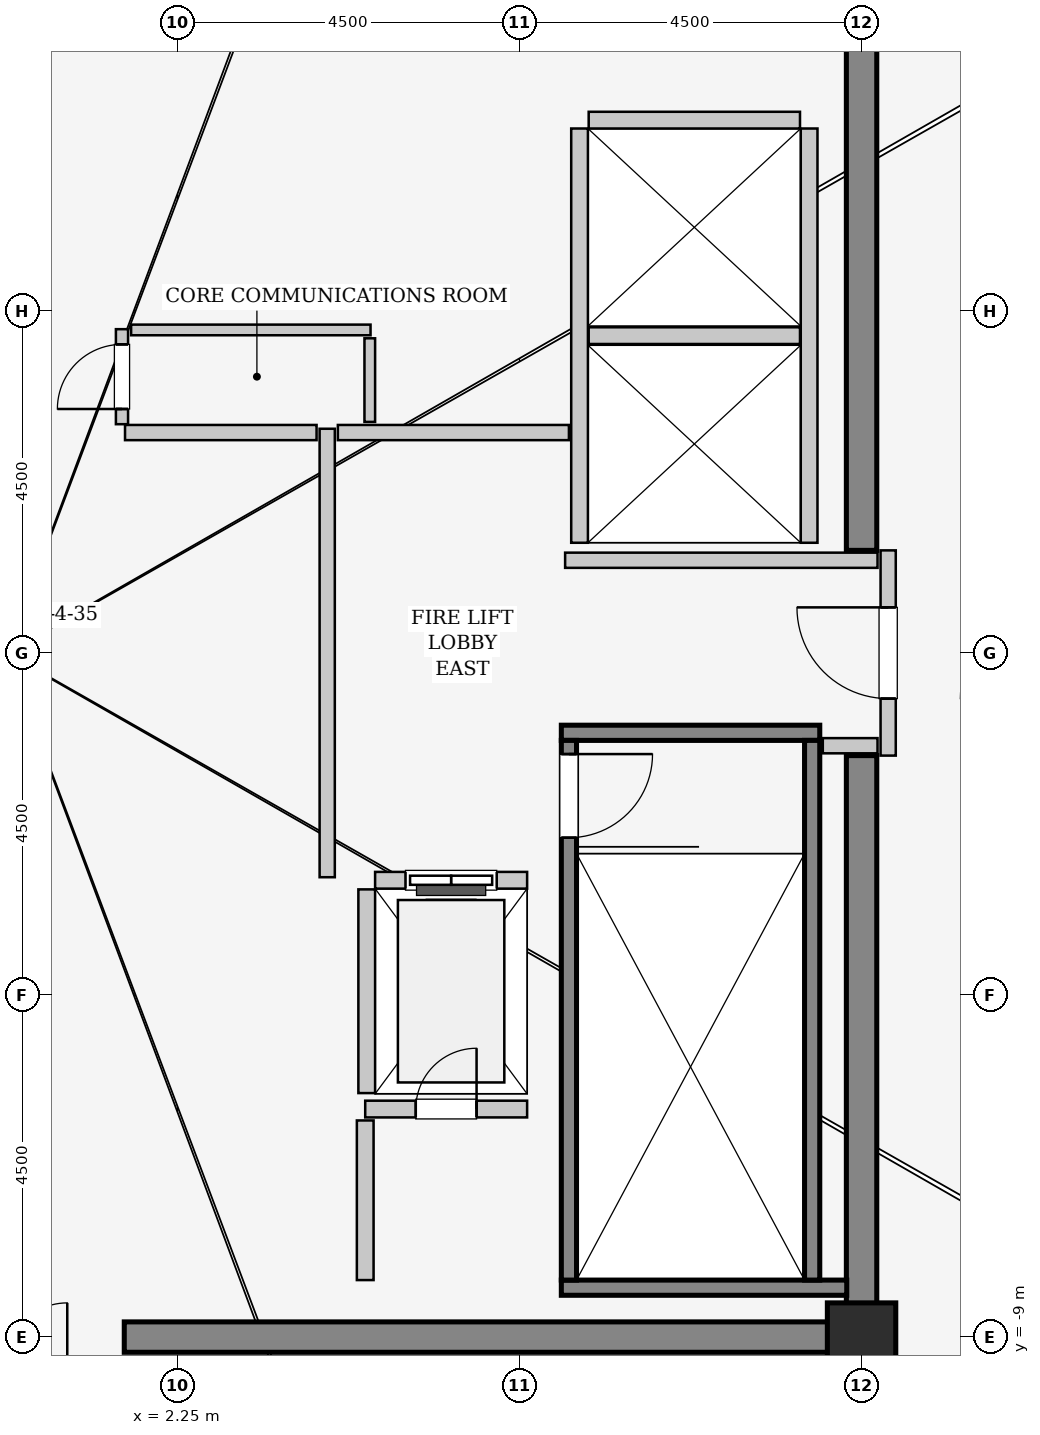
"""IFC4 building model, lengths in metres.
Left out: names, types, materials, properties, quantities, classifications, styles, units other than length and angle.
Written with IfcOpenShell. Run it as: python <this file> out.ifc"""

import sys

from ifc_helpers import new_model, si_unit, direction, frame, frame_2d, origin, origin_2d, place, context, subcontext, project, spatial, rectangle, extrude, source, transform, mapped, element, fill, save


model = new_model("IFC4")
c1 = context("Model", 3, precision=1e-05, world=origin(), true_north=direction((0.0, 1.0)))
c2 = subcontext(c1, "Body", "Model", "MODEL_VIEW")
j1 = project(units=[si_unit("LENGTHUNIT", "METRE"), si_unit("PLANEANGLEUNIT", "RADIAN")], contexts=[c1])
p1 = place(None, origin())
s1 = spatial("IfcSite", under=j1, at=p1, CompositionType="ELEMENT")
p2 = place(p1, origin())
s2 = spatial("IfcBuilding", under=s1, at=p2, CompositionType="ELEMENT")
p3 = place(p2, frame((0.0, 0.0, 367.4)))
s3 = spatial("IfcBuildingStorey", under=s2, at=p3, CompositionType="ELEMENT", Elevation=367.4)
m1 = source(origin(), c2, "Body", "SweptSolid", [
    extrude(rectangle(XDim=9.9, YDim=0.4, at=frame_2d((4.95, 0.0))), origin(), (0.0, 0.0, 1.0), 4.4),
])
p4 = place(p3, frame((1.55, -9.0, 0.0), z_axis=(0.0, 0.0, 1.0), x_axis=(1.0, 0.0, 0.0)))
e1 = element("IfcWall", 1, at=p4, inside=s3, PredefinedType="SHEAR", context=c2, shape_type="MappedRepresentation", body=[
    mapped(m1, transform((0.0, 0.0, 0.0), x_axis=(1.0, 0.0, 0.0), y_axis=(0.0, 1.0, 0.0), z_axis=(0.0, 0.0, 1.0), scale=1.0)),
])
m2 = source(origin(), c2, "Body", "SweptSolid", [
    extrude(rectangle(XDim=7.45, YDim=0.4, at=frame_2d((3.725, 0.0))), origin(), (0.0, 0.0, 1.0), 4.4),
])
for number, where, z_axis, x_axis in (
    (2, (11.25, -8.8, 0.0), (0.0, 0.0, 1.0), (0.0, 1.0, 0.0)),
    (3, (11.25, 1.35, 0.0), (0.0, 0.0, 1.0), (0.0, 1.0, 0.0)),
):
    element("IfcWall", number, at=place(p3, frame(where, z_axis=z_axis, x_axis=x_axis)), inside=s3, PredefinedType="SHEAR", context=c2, shape_type="MappedRepresentation", body=[
        mapped(m2, transform((0.0, 0.0, 0.0), x_axis=(1.0, 0.0, 0.0), y_axis=(0.0, 1.0, 0.0), z_axis=(0.0, 0.0, 1.0), scale=1.0)),
    ])
m3 = source(origin(), c2, "Body", "SweptSolid", [
    extrude(rectangle(XDim=0.9, YDim=0.9, at=origin_2d()), origin(), (0.0, 0.0, 1.0), 4.4),
])
p5 = place(p3, frame((11.25, -9.0, 0.0), z_axis=(0.0, 0.0, 1.0), x_axis=(1.0, 0.0, 0.0)))
e4 = element("IfcColumn", 4, at=p5, inside=s3, PredefinedType="COLUMN", context=c2, shape_type="MappedRepresentation", body=[
    mapped(m3, transform((0.0, 0.0, 0.0), x_axis=(1.0, 0.0, 0.0), y_axis=(0.0, 1.0, 0.0), z_axis=(0.0, 0.0, 1.0), scale=1.0)),
])
m4 = source(origin(), c2, "Body", "SweptSolid", [
    extrude(rectangle(XDim=3.4, YDim=0.2, at=frame_2d((1.7, 0.0))), origin(), (0.0, 0.0, 1.0), 4.1),
])
p6 = place(p3, frame((7.3, -1.05, 0.0), z_axis=(0.0, 0.0, 1.0), x_axis=(1.0, 0.0, 0.0)))
e5 = element("IfcWall", 5, at=p6, inside=s3, PredefinedType="SOLIDWALL", context=c2, shape_type="MappedRepresentation", body=[
    mapped(m4, transform((0.0, 0.0, 0.0), x_axis=(1.0, 0.0, 0.0), y_axis=(0.0, 1.0, 0.0), z_axis=(0.0, 0.0, 1.0), scale=1.0)),
])
m5 = source(origin(), c2, "Body", "SweptSolid", [
    extrude(rectangle(XDim=3.755, YDim=0.2, at=frame_2d((1.877, 0.0))), origin(), (0.0, 0.0, 1.0), 4.1),
])
p7 = place(p3, frame((7.3, -8.35, 0.0), z_axis=(0.0, 0.0, 1.0), x_axis=(1.0, 0.0, 0.0)))
e6 = element("IfcWall", 6, at=p7, inside=s3, PredefinedType="SOLIDWALL", context=c2, shape_type="MappedRepresentation", body=[
    mapped(m5, transform((0.0, 0.0, 0.0), x_axis=(1.0, 0.0, 0.0), y_axis=(0.0, 1.0, 0.0), z_axis=(0.0, 0.0, 1.0), scale=1.0)),
])
m6 = source(origin(), c2, "Body", "SweptSolid", [
    extrude(rectangle(XDim=7.1, YDim=0.2, at=frame_2d((3.55, 0.0))), origin(), (0.0, 0.0, 1.0), 4.1),
])
p8 = place(p3, frame((7.4, -1.15, 0.0), z_axis=(0.0, 0.0, 1.0), x_axis=(0.0, -1.0, 0.0)))
e7 = element("IfcWall", 7, at=p8, inside=s3, PredefinedType="SOLIDWALL", context=c2, shape_type="MappedRepresentation", body=[
    mapped(m6, transform((0.0, 0.0, 0.0), x_axis=(1.0, 0.0, 0.0), y_axis=(0.0, 1.0, 0.0), z_axis=(0.0, 0.0, 1.0), scale=1.0)),
])
p9 = place(p8, frame((0.18, 0.0, 0.0)))
e8 = element("IfcOpeningElement", 8, at=p9, cuts=e7, PredefinedType="OPENING", context=c2, shape_type="SweptSolid", body=[
    extrude(rectangle(XDim=1.1, YDim=2.15, at=frame_2d((0.55, 1.075))), frame((0.0, 0.11, 0.0), z_axis=(0.0, -1.0, 0.0), x_axis=(1.0, 0.0, 0.0)), (0.0, 0.0, 1.0), 0.22),
])
p10 = place(p3, frame((10.6, -1.15, 0.0), z_axis=(0.0, 0.0, 1.0), x_axis=(0.0, -1.0, 0.0)))
e9 = element("IfcWall", 9, at=p10, inside=s3, PredefinedType="SOLIDWALL", context=c2, shape_type="MappedRepresentation", body=[
    mapped(m6, transform((0.0, 0.0, 0.0), x_axis=(1.0, 0.0, 0.0), y_axis=(0.0, 1.0, 0.0), z_axis=(0.0, 0.0, 1.0), scale=1.0)),
])
m7 = source(origin(), c2, "Body", "SweptSolid", [
    extrude(rectangle(XDim=2.0, YDim=0.22, at=frame_2d((1.0, 0.0))), origin(), (0.0, 0.0, 1.0), 4.085),
])
p11 = place(p3, frame((6.85, -2.99, 0.0), z_axis=(0.0, 0.0, 1.0), x_axis=(-1.0, 0.0, 0.0)))
e10 = element("IfcWall", 10, at=p11, inside=s3, PredefinedType="SOLIDWALL", context=c2, shape_type="MappedRepresentation", body=[
    mapped(m7, transform((0.0, 0.0, 0.0), x_axis=(1.0, 0.0, 0.0), y_axis=(0.0, 1.0, 0.0), z_axis=(0.0, 0.0, 1.0), scale=1.0)),
])
p12 = place(p11, frame((0.4, 0.0, 0.0)))
e11 = element("IfcOpeningElement", 11, at=p12, cuts=e10, PredefinedType="OPENING", context=c2, shape_type="SweptSolid", body=[
    extrude(rectangle(XDim=1.2, YDim=2.2, at=frame_2d((0.6, 1.1))), frame((0.0, 0.12, 0.0), z_axis=(0.0, -1.0, 0.0), x_axis=(1.0, 0.0, 0.0)), (0.0, 0.0, 1.0), 0.24),
])
m8 = source(origin(), c2, "Body", "SweptSolid", [
    extrude(rectangle(XDim=2.68, YDim=0.22, at=frame_2d((1.34, 0.0))), origin(), (0.0, 0.0, 1.0), 4.085),
])
p13 = place(p3, frame((4.74, -3.11, 0.0), z_axis=(0.0, 0.0, 1.0), x_axis=(0.0, -1.0, 0.0)))
e12 = element("IfcWall", 12, at=p13, inside=s3, PredefinedType="SOLIDWALL", context=c2, shape_type="MappedRepresentation", body=[
    mapped(m8, transform((0.0, 0.0, 0.0), x_axis=(1.0, 0.0, 0.0), y_axis=(0.0, 1.0, 0.0), z_axis=(0.0, 0.0, 1.0), scale=1.0)),
])
m9 = source(origin(), c2, "Body", "SweptSolid", [
    extrude(rectangle(XDim=5.45, YDim=0.22, at=frame_2d((2.725, 0.0))), origin(), (0.0, 0.0, 1.0), 4.085),
])
for number, where, z_axis, x_axis in (
    (13, (7.54, 6.9, 0.0), (0.0, 0.0, 1.0), (0.0, -1.0, 0.0)),
    (14, (10.56, 1.45, 0.0), (0.0, 0.0, 1.0), (0.0, 1.0, 0.0)),
):
    element("IfcWall", number, at=place(p3, frame(where, z_axis=z_axis, x_axis=x_axis)), inside=s3, PredefinedType="SOLIDWALL", context=c2, shape_type="MappedRepresentation", body=[
        mapped(m9, transform((0.0, 0.0, 0.0), x_axis=(1.0, 0.0, 0.0), y_axis=(0.0, 1.0, 0.0), z_axis=(0.0, 0.0, 1.0), scale=1.0)),
    ])
m10 = source(origin(), c2, "Body", "SweptSolid", [
    extrude(rectangle(XDim=2.78, YDim=0.22, at=frame_2d((1.39, 0.0))), origin(), (0.0, 0.0, 1.0), 4.085),
])
for number, where, z_axis, x_axis in (
    (15, (7.66, 4.175, 0.0), (0.0, 0.0, 1.0), (1.0, 0.0, 0.0)),
    (16, (10.44, 7.01, 0.0), (0.0, 0.0, 1.0), (-1.0, 0.0, 0.0)),
):
    element("IfcWall", number, at=place(p3, frame(where, z_axis=z_axis, x_axis=x_axis)), inside=s3, PredefinedType="SOLIDWALL", context=c2, shape_type="MappedRepresentation", body=[
        mapped(m10, transform((0.0, 0.0, 0.0), x_axis=(1.0, 0.0, 0.0), y_axis=(0.0, 1.0, 0.0), z_axis=(0.0, 0.0, 1.0), scale=1.0)),
    ])
m11 = source(origin(), c2, "Body", "SweptSolid", [
    extrude(rectangle(XDim=2.13, YDim=0.22, at=frame_2d((1.065, 0.0))), origin(), (0.0, 0.0, 1.0), 4.085),
])
p14 = place(p3, frame((4.72, -6.0, 0.0), z_axis=(0.0, 0.0, 1.0), x_axis=(1.0, 0.0, 0.0)))
e17 = element("IfcWall", 17, at=p14, inside=s3, PredefinedType="SOLIDWALL", context=c2, shape_type="MappedRepresentation", body=[
    mapped(m11, transform((0.0, 0.0, 0.0), x_axis=(1.0, 0.0, 0.0), y_axis=(0.0, 1.0, 0.0), z_axis=(0.0, 0.0, 1.0), scale=1.0)),
])
p15 = place(p14, frame((0.665, 0.0, 0.0)))
e18 = element("IfcOpeningElement", 18, at=p15, cuts=e17, PredefinedType="OPENING", context=c2, shape_type="SweptSolid", body=[
    extrude(rectangle(XDim=0.8, YDim=2.0, at=frame_2d((0.4, 1.0))), frame((0.0, 0.12, 0.0), z_axis=(0.0, -1.0, 0.0), x_axis=(1.0, 0.0, 0.0)), (0.0, 0.0, 1.0), 0.24),
])
m12 = source(origin(), c2, "Body", "SweptSolid", [
    extrude(rectangle(XDim=2.1, YDim=0.22, at=frame_2d((1.05, 0.0))), origin(), (0.0, 0.0, 1.0), 4.085),
])
p16 = place(p3, frame((4.72, -8.25, 0.0), z_axis=(0.0, 0.0, 1.0), x_axis=(0.0, 1.0, 0.0)))
e19 = element("IfcWall", 19, at=p16, inside=s3, PredefinedType="SOLIDWALL", context=c2, shape_type="MappedRepresentation", body=[
    mapped(m12, transform((0.0, 0.0, 0.0), x_axis=(1.0, 0.0, 0.0), y_axis=(0.0, 1.0, 0.0), z_axis=(0.0, 0.0, 1.0), scale=1.0)),
])
m13 = source(origin(), c2, "Body", "SweptSolid", [
    extrude(rectangle(XDim=2.7, YDim=0.2, at=frame_2d((1.35, 0.0))), origin(), (0.0, 0.0, 1.0), 3.175),
])
p17 = place(p3, frame((11.6, -1.35, 0.0), z_axis=(0.0, 0.0, 1.0), x_axis=(0.0, 1.0, 0.0)))
e20 = element("IfcWall", 20, at=p17, inside=s3, PredefinedType="PARTITIONING", context=c2, shape_type="MappedRepresentation", body=[
    mapped(m13, transform((0.0, 0.0, 0.0), x_axis=(1.0, 0.0, 0.0), y_axis=(0.0, 1.0, 0.0), z_axis=(0.0, 0.0, 1.0), scale=1.0)),
])
p18 = place(p17, frame((0.75, 0.0, 0.0)))
e21 = element("IfcOpeningElement", 21, at=p18, cuts=e20, PredefinedType="OPENING", context=c2, shape_type="SweptSolid", body=[
    extrude(rectangle(XDim=1.2, YDim=2.15, at=frame_2d((0.6, 1.075))), frame((0.0, 0.11, 0.0), z_axis=(0.0, -1.0, 0.0), x_axis=(1.0, 0.0, 0.0)), (0.0, 0.0, 1.0), 0.22),
])
m14 = source(origin(), c2, "Body", "SweptSolid", [
    extrude(rectangle(XDim=5.9, YDim=0.2, at=frame_2d((2.95, 0.0))), origin(), (0.0, 0.0, 1.0), 4.085),
])
p19 = place(p3, frame((4.22, -2.95, 0.0), z_axis=(0.0, 0.0, 1.0), x_axis=(0.0, 1.0, 0.0)))
e22 = element("IfcWall", 22, at=p19, inside=s3, PredefinedType="PARTITIONING", context=c2, shape_type="MappedRepresentation", body=[
    mapped(m14, transform((0.0, 0.0, 0.0), x_axis=(1.0, 0.0, 0.0), y_axis=(0.0, 1.0, 0.0), z_axis=(0.0, 0.0, 1.0), scale=1.0)),
])
m15 = source(origin(), c2, "Body", "SweptSolid", [
    extrude(rectangle(XDim=2.52, YDim=0.2, at=frame_2d((1.26, 0.0))), origin(), (0.0, 0.0, 1.0), 4.085),
])
p20 = place(p3, frame((1.56, 2.9, 0.0), z_axis=(0.0, 0.0, 1.0), x_axis=(1.0, 0.0, 0.0)))
e23 = element("IfcWall", 23, at=p20, inside=s3, PredefinedType="PARTITIONING", context=c2, shape_type="MappedRepresentation", body=[
    mapped(m15, transform((0.0, 0.0, 0.0), x_axis=(1.0, 0.0, 0.0), y_axis=(0.0, 1.0, 0.0), z_axis=(0.0, 0.0, 1.0), scale=1.0)),
])
m16 = source(origin(), c2, "Body", "SweptSolid", [
    extrude(rectangle(XDim=3.04, YDim=0.2, at=frame_2d((1.52, 0.0))), origin(), (0.0, 0.0, 1.0), 4.085),
])
p21 = place(p3, frame((4.36, 2.9, 0.0), z_axis=(0.0, 0.0, 1.0), x_axis=(1.0, 0.0, 0.0)))
e24 = element("IfcWall", 24, at=p21, inside=s3, PredefinedType="PARTITIONING", context=c2, shape_type="MappedRepresentation", body=[
    mapped(m16, transform((0.0, 0.0, 0.0), x_axis=(1.0, 0.0, 0.0), y_axis=(0.0, 1.0, 0.0), z_axis=(0.0, 0.0, 1.0), scale=1.0)),
])
m17 = source(origin(), c2, "Body", "SweptSolid", [
    extrude(rectangle(XDim=4.11, YDim=0.2, at=frame_2d((2.055, 0.0))), origin(), (0.0, 0.0, 1.0), 4.085),
])
p22 = place(p3, frame((7.35, 1.22, 0.0), z_axis=(0.0, 0.0, 1.0), x_axis=(1.0, 0.0, 0.0)))
e25 = element("IfcWall", 25, at=p22, inside=s3, PredefinedType="PARTITIONING", context=c2, shape_type="MappedRepresentation", body=[
    mapped(m17, transform((0.0, 0.0, 0.0), x_axis=(1.0, 0.0, 0.0), y_axis=(0.0, 1.0, 0.0), z_axis=(0.0, 0.0, 1.0), scale=1.0)),
])
m18 = source(origin(), c2, "Body", "SweptSolid", [
    extrude(rectangle(XDim=0.72, YDim=0.2, at=frame_2d((0.36, 0.0))), origin(), (0.0, 0.0, 1.0), 4.085),
])
p23 = place(p3, frame((10.74, -1.22, 0.0), z_axis=(0.0, 0.0, 1.0), x_axis=(1.0, 0.0, 0.0)))
e26 = element("IfcWall", 26, at=p23, inside=s3, PredefinedType="PARTITIONING", context=c2, shape_type="MappedRepresentation", body=[
    mapped(m18, transform((0.0, 0.0, 0.0), x_axis=(1.0, 0.0, 0.0), y_axis=(0.0, 1.0, 0.0), z_axis=(0.0, 0.0, 1.0), scale=1.0)),
])
m19 = source(origin(), c2, "Body", "SweptSolid", [
    extrude(rectangle(XDim=1.25, YDim=0.16, at=frame_2d((0.625, 0.0))), origin(), (0.0, 0.0, 1.0), 4.085),
])
p24 = place(p3, frame((1.52, 3.01, 0.0), z_axis=(0.0, 0.0, 1.0), x_axis=(0.0, 1.0, 0.0)))
e27 = element("IfcWall", 27, at=p24, inside=s3, PredefinedType="PARTITIONING", context=c2, shape_type="MappedRepresentation", body=[
    mapped(m19, transform((0.0, 0.0, 0.0), x_axis=(1.0, 0.0, 0.0), y_axis=(0.0, 1.0, 0.0), z_axis=(0.0, 0.0, 1.0), scale=1.0)),
])
p25 = place(p24, frame((0.2, 0.0, 0.0)))
e28 = element("IfcOpeningElement", 28, at=p25, cuts=e27, PredefinedType="OPENING", context=c2, shape_type="SweptSolid", body=[
    extrude(rectangle(XDim=0.85, YDim=2.1, at=frame_2d((0.425, 1.05))), frame((0.0, 0.09, 0.0), z_axis=(0.0, -1.0, 0.0), x_axis=(1.0, 0.0, 0.0)), (0.0, 0.0, 1.0), 0.18),
])
m20 = source(origin(), c2, "Body", "SweptSolid", [
    extrude(rectangle(XDim=3.15, YDim=0.14, at=frame_2d((1.575, 0.0))), origin(), (0.0, 0.0, 1.0), 4.085),
])
p26 = place(p3, frame((1.64, 4.25, 0.0), z_axis=(0.0, 0.0, 1.0), x_axis=(1.0, 0.0, 0.0)))
e29 = element("IfcWall", 29, at=p26, inside=s3, PredefinedType="PARTITIONING", context=c2, shape_type="MappedRepresentation", body=[
    mapped(m20, transform((0.0, 0.0, 0.0), x_axis=(1.0, 0.0, 0.0), y_axis=(0.0, 1.0, 0.0), z_axis=(0.0, 0.0, 1.0), scale=1.0)),
])
m21 = source(origin(), c2, "Body", "SweptSolid", [
    extrude(rectangle(XDim=1.1, YDim=0.14, at=frame_2d((0.55, 0.0))), origin(), (0.0, 0.0, 1.0), 4.085),
])
p27 = place(p3, frame((4.78, 3.04, 0.0), z_axis=(0.0, 0.0, 1.0), x_axis=(0.0, 1.0, 0.0)))
e30 = element("IfcWall", 30, at=p27, inside=s3, PredefinedType="PARTITIONING", context=c2, shape_type="MappedRepresentation", body=[
    mapped(m21, transform((0.0, 0.0, 0.0), x_axis=(1.0, 0.0, 0.0), y_axis=(0.0, 1.0, 0.0), z_axis=(0.0, 0.0, 1.0), scale=1.0)),
])
m22 = source(origin(), c2, "Body", "SweptSolid", [
    extrude(rectangle(XDim=1.1, YDim=2.15, at=frame_2d((0.55, 1.075))), frame((0.0, 0.025, 0.0), z_axis=(0.0, -1.0, 0.0), x_axis=(1.0, 0.0, 0.0)), (0.0, 0.0, 1.0), 0.05),
])
p28 = place(p9, origin())
e31 = element("IfcDoor", 31, at=p28, inside=s3, OperationType="SINGLE_SWING_LEFT", PredefinedType="DOOR", context=c2, shape_type="MappedRepresentation", body=[
    mapped(m22, transform((0.0, 0.0, 0.0), x_axis=(1.0, 0.0, 0.0), y_axis=(0.0, 1.0, 0.0), z_axis=(0.0, 0.0, 1.0), scale=1.0)),
])
fill(e8, e31)
m23 = source(origin(), c2, "Body", "SweptSolid", [
    extrude(rectangle(XDim=1.2, YDim=2.2, at=frame_2d((0.6, 1.1))), frame((0.0, 0.025, 0.0), z_axis=(0.0, -1.0, 0.0), x_axis=(1.0, 0.0, 0.0)), (0.0, 0.0, 1.0), 0.05),
])
p29 = place(p12, origin())
e32 = element("IfcDoor", 32, at=p29, inside=s3, OperationType="SLIDING_TO_LEFT", PredefinedType="DOOR", context=c2, shape_type="MappedRepresentation", body=[
    mapped(m23, transform((0.0, 0.0, 0.0), x_axis=(1.0, 0.0, 0.0), y_axis=(0.0, 1.0, 0.0), z_axis=(0.0, 0.0, 1.0), scale=1.0)),
])
fill(e11, e32)
m24 = source(origin(), c2, "Body", "SweptSolid", [
    extrude(rectangle(XDim=0.8, YDim=2.0, at=frame_2d((0.4, 1.0))), frame((0.0, 0.025, 0.0), z_axis=(0.0, -1.0, 0.0), x_axis=(1.0, 0.0, 0.0)), (0.0, 0.0, 1.0), 0.05),
])
p30 = place(p15, origin())
e33 = element("IfcDoor", 33, at=p30, inside=s3, OperationType="SINGLE_SWING_RIGHT", PredefinedType="TRAPDOOR", context=c2, shape_type="MappedRepresentation", body=[
    mapped(m24, transform((0.0, 0.0, 0.0), x_axis=(1.0, 0.0, 0.0), y_axis=(0.0, 1.0, 0.0), z_axis=(0.0, 0.0, 1.0), scale=1.0)),
])
fill(e18, e33)
m25 = source(origin(), c2, "Body", "SweptSolid", [
    extrude(rectangle(XDim=1.2, YDim=2.15, at=frame_2d((0.6, 1.075))), frame((0.0, 0.025, 0.0), z_axis=(0.0, -1.0, 0.0), x_axis=(1.0, 0.0, 0.0)), (0.0, 0.0, 1.0), 0.05),
])
p31 = place(p18, origin())
e34 = element("IfcDoor", 34, at=p31, inside=s3, OperationType="SINGLE_SWING_RIGHT", PredefinedType="DOOR", context=c2, shape_type="MappedRepresentation", body=[
    mapped(m25, transform((0.0, 0.0, 0.0), x_axis=(1.0, 0.0, 0.0), y_axis=(0.0, 1.0, 0.0), z_axis=(0.0, 0.0, 1.0), scale=1.0)),
])
fill(e21, e34)
m26 = source(origin(), c2, "Body", "SweptSolid", [
    extrude(rectangle(XDim=0.85, YDim=2.1, at=frame_2d((0.425, 1.05))), frame((0.0, 0.025, 0.0), z_axis=(0.0, -1.0, 0.0), x_axis=(1.0, 0.0, 0.0)), (0.0, 0.0, 1.0), 0.05),
])
p32 = place(p25, origin())
e35 = element("IfcDoor", 35, at=p32, inside=s3, OperationType="SINGLE_SWING_LEFT", PredefinedType="DOOR", context=c2, shape_type="MappedRepresentation", body=[
    mapped(m26, transform((0.0, 0.0, 0.0), x_axis=(1.0, 0.0, 0.0), y_axis=(0.0, 1.0, 0.0), z_axis=(0.0, 0.0, 1.0), scale=1.0)),
])
fill(e28, e35)
save(model, sys.argv[1])
